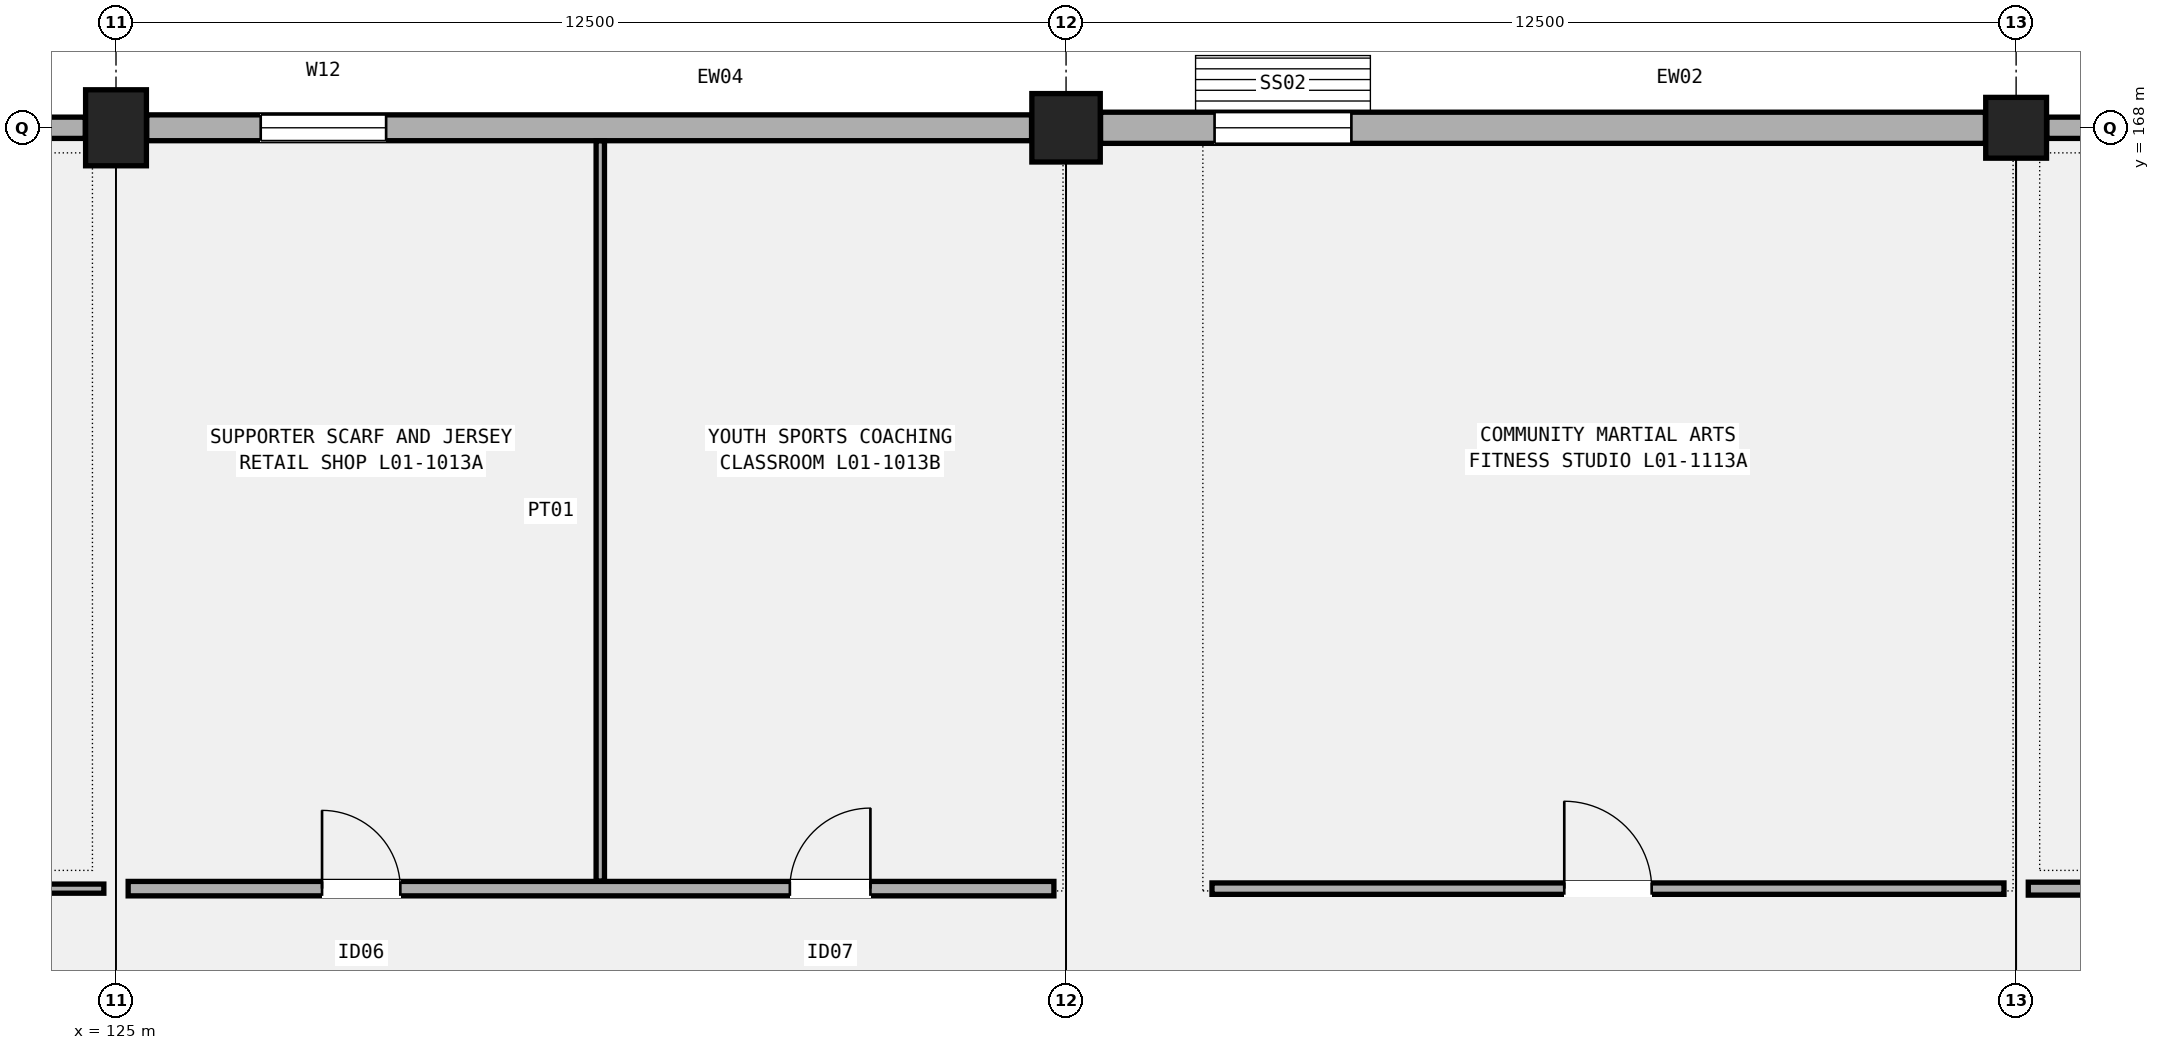
"""IFC4 building model, lengths in metres.
Left out: names, types, materials, properties, quantities, classifications, styles, units other than length and angle.
Written with IfcOpenShell. Run it as: python <this file> out.ifc"""

import sys

from ifc_helpers import new_model, si_unit, direction, frame, frame_2d, origin, origin_2d, place, context, subcontext, project, spatial, rectangle, extrude, element, fill, save


model = new_model("IFC4")
c1 = context("Model", 3, precision=1e-05, world=origin(), true_north=direction((0.0, 1.0)))
c2 = subcontext(c1, "Body", "Model", "MODEL_VIEW")
j1 = project(units=[si_unit("LENGTHUNIT", "METRE"), si_unit("PLANEANGLEUNIT", "RADIAN")], contexts=[c1])
p1 = place(None, origin())
s1 = spatial("IfcSite", under=j1, at=p1, CompositionType="ELEMENT")
p2 = place(p1, origin())
s2 = spatial("IfcBuilding", under=s1, at=p2, CompositionType="ELEMENT")
p3 = place(p2, frame((0.0, 0.0, 5.4)))
s3 = spatial("IfcBuildingStorey", under=s2, at=p3, CompositionType="ELEMENT", Elevation=5.4)
p4 = place(p3, frame((125.0, 168.0, 0.0), z_axis=(0.0, 0.0, 1.0), x_axis=(1.0, 0.0, 0.0)))
e1 = element("IfcColumn", 1, at=p4, inside=s3, PredefinedType="COLUMN", context=c2, shape_type="SweptSolid", body=[
    extrude(rectangle(XDim=0.8, YDim=1.0, at=origin_2d()), origin(), (0.0, 0.0, 1.0), 4.8),
])
p5 = place(p3, frame((137.5, 168.0, 0.0), z_axis=(0.0, 0.0, 1.0), x_axis=(1.0, 0.0, 0.0)))
e2 = element("IfcColumn", 2, at=p5, inside=s3, PredefinedType="COLUMN", context=c2, shape_type="SweptSolid", body=[
    extrude(rectangle(XDim=0.9, YDim=0.9, at=origin_2d()), origin(), (0.0, 0.0, 1.0), 4.8),
])
p6 = place(p3, frame((150.0, 168.0, 0.0), z_axis=(0.0, 0.0, 1.0), x_axis=(1.0, 0.0, 0.0)))
e3 = element("IfcColumn", 3, at=p6, inside=s3, PredefinedType="COLUMN", context=c2, shape_type="SweptSolid", body=[
    extrude(rectangle(XDim=0.8, YDim=0.8, at=origin_2d()), origin(), (0.0, 0.0, 1.0), 4.8),
])
p7 = place(p3, frame((112.404, 168.0, 0.0), z_axis=(0.0, 0.0, 1.0), x_axis=(1.0, 0.0, 0.0)))
e4 = element("IfcWall", 4, at=p7, inside=s3, PredefinedType="SOLIDWALL", context=c2, shape_type="SweptSolid", body=[
    extrude(rectangle(XDim=12.192, YDim=0.28, at=frame_2d((6.096, 0.0))), origin(), (0.0, 0.0, 1.0), 4.2),
])
p8 = place(p7, frame((2.75, 0.0, 0.95)))
e5 = element("IfcOpeningElement", 5, at=p8, cuts=e4, PredefinedType="OPENING", context=c2, shape_type="SweptSolid", body=[
    extrude(rectangle(XDim=1.5, YDim=2.25, at=frame_2d((0.75, 1.125))), frame((0.0, 0.15, 0.0), z_axis=(0.0, -1.0, 0.0), x_axis=(1.0, 0.0, 0.0)), (0.0, 0.0, 1.0), 0.3),
])
p9 = place(p3, frame((125.404, 168.0, 0.0), z_axis=(0.0, 0.0, 1.0), x_axis=(1.0, 0.0, 0.0)))
e6 = element("IfcWall", 6, at=p9, inside=s3, PredefinedType="SOLIDWALL", context=c2, shape_type="SweptSolid", body=[
    extrude(rectangle(XDim=11.642, YDim=0.34, at=frame_2d((5.821, 0.0))), origin(), (0.0, 0.0, 1.0), 4.15),
])
p10 = place(p9, frame((1.5, 0.0, 0.95)))
e7 = element("IfcOpeningElement", 7, at=p10, cuts=e6, PredefinedType="OPENING", context=c2, shape_type="SweptSolid", body=[
    extrude(rectangle(XDim=1.65, YDim=2.45, at=frame_2d((0.825, 1.225))), frame((0.0, 0.18, 0.0), z_axis=(0.0, -1.0, 0.0), x_axis=(1.0, 0.0, 0.0)), (0.0, 0.0, 1.0), 0.36),
])
p11 = place(p3, frame((137.954, 168.0, 0.0), z_axis=(0.0, 0.0, 1.0), x_axis=(1.0, 0.0, 0.0)))
e8 = element("IfcWall", 8, at=p11, inside=s3, PredefinedType="SOLIDWALL", context=c2, shape_type="SweptSolid", body=[
    extrude(rectangle(XDim=11.642, YDim=0.41, at=frame_2d((5.821, 0.0))), origin(), (0.0, 0.0, 1.0), 4.2),
])
p12 = place(p11, frame((1.5, 0.0, 0.95)))
e9 = element("IfcOpeningElement", 9, at=p12, cuts=e8, PredefinedType="OPENING", context=c2, shape_type="SweptSolid", body=[
    extrude(rectangle(XDim=1.8, YDim=2.15, at=frame_2d((0.9, 1.075))), frame((0.0, 0.215, 0.0), z_axis=(0.0, -1.0, 0.0), x_axis=(1.0, 0.0, 0.0)), (0.0, 0.0, 1.0), 0.43),
])
p13 = place(p3, frame((150.404, 168.0, 0.0), z_axis=(0.0, 0.0, 1.0), x_axis=(1.0, 0.0, 0.0)))
e10 = element("IfcWall", 10, at=p13, inside=s3, PredefinedType="SOLIDWALL", context=c2, shape_type="SweptSolid", body=[
    extrude(rectangle(XDim=11.692, YDim=0.28, at=frame_2d((5.846, 0.0))), origin(), (0.0, 0.0, 1.0), 4.15),
])
p14 = place(p13, frame((1.5, 0.0, 0.95)))
e11 = element("IfcOpeningElement", 11, at=p14, cuts=e10, PredefinedType="OPENING", context=c2, shape_type="SweptSolid", body=[
    extrude(rectangle(XDim=1.95, YDim=1.9, at=frame_2d((0.975, 0.95))), frame((0.0, 0.15, 0.0), z_axis=(0.0, -1.0, 0.0), x_axis=(1.0, 0.0, 0.0)), (0.0, 0.0, 1.0), 0.3),
])
p15 = place(p3, frame((112.16, 157.99, 0.0), z_axis=(0.0, 0.0, 1.0), x_axis=(1.0, 0.0, 0.0)))
e12 = element("IfcWall", 12, at=p15, inside=s3, PredefinedType="PARTITIONING", context=c2, shape_type="SweptSolid", body=[
    extrude(rectangle(XDim=12.68, YDim=0.12, at=frame_2d((6.34, 0.0))), origin(), (0.0, 0.0, 1.0), 3.92),
])
p16 = place(p15, frame((5.85, 0.0, 0.0)))
e13 = element("IfcOpeningElement", 13, at=p16, cuts=e12, PredefinedType="OPENING", context=c2, shape_type="SweptSolid", body=[
    extrude(rectangle(XDim=0.98, YDim=2.1, at=frame_2d((0.49, 1.05))), frame((0.0, 0.07, 0.0), z_axis=(0.0, -1.0, 0.0), x_axis=(1.0, 0.0, 0.0)), (0.0, 0.0, 1.0), 0.14),
])
p17 = place(p3, frame((125.16, 157.99, 0.0), z_axis=(0.0, 0.0, 1.0), x_axis=(1.0, 0.0, 0.0)))
e14 = element("IfcWall", 14, at=p17, inside=s3, PredefinedType="PARTITIONING", context=c2, shape_type="SweptSolid", body=[
    extrude(rectangle(XDim=12.18, YDim=0.19, at=frame_2d((6.09, 0.0))), origin(), (0.0, 0.0, 1.0), 3.92),
])
p18 = place(p17, frame((2.551, 0.0, 0.0)))
e15 = element("IfcOpeningElement", 15, at=p18, cuts=e14, PredefinedType="OPENING", context=c2, shape_type="SweptSolid", body=[
    extrude(rectangle(XDim=1.03, YDim=2.12, at=frame_2d((0.515, 1.06))), frame((0.0, 0.105, 0.0), z_axis=(0.0, -1.0, 0.0), x_axis=(1.0, 0.0, 0.0)), (0.0, 0.0, 1.0), 0.21),
])
p19 = place(p17, frame((8.706, 0.0, 0.0)))
e16 = element("IfcOpeningElement", 16, at=p19, cuts=e14, PredefinedType="OPENING", context=c2, shape_type="SweptSolid", body=[
    extrude(rectangle(XDim=1.06, YDim=2.15, at=frame_2d((0.53, 1.075))), frame((0.0, 0.105, 0.0), z_axis=(0.0, -1.0, 0.0), x_axis=(1.0, 0.0, 0.0)), (0.0, 0.0, 1.0), 0.21),
])
p20 = place(p3, frame((131.372, 158.09, 0.0), z_axis=(0.0, 0.0, 1.0), x_axis=(0.0, 1.0, 0.0)))
e17 = element("IfcWall", 17, at=p20, inside=s3, PredefinedType="PARTITIONING", context=c2, shape_type="SweptSolid", body=[
    extrude(rectangle(XDim=9.738, YDim=0.11, at=frame_2d((4.869, 0.0))), origin(), (0.0, 0.0, 1.0), 3.92),
])
p21 = place(p3, frame((139.42, 157.99, 0.0), z_axis=(0.0, 0.0, 1.0), x_axis=(1.0, 0.0, 0.0)))
e18 = element("IfcWall", 18, at=p21, inside=s3, PredefinedType="PARTITIONING", context=c2, shape_type="SweptSolid", body=[
    extrude(rectangle(XDim=10.42, YDim=0.15, at=frame_2d((5.21, 0.0))), origin(), (0.0, 0.0, 1.0), 3.92),
])
p22 = place(p21, frame((4.635, 0.0, 0.0)))
e19 = element("IfcOpeningElement", 19, at=p22, cuts=e18, PredefinedType="OPENING", context=c2, shape_type="SweptSolid", body=[
    extrude(rectangle(XDim=1.15, YDim=2.15, at=frame_2d((0.575, 1.075))), frame((0.0, 0.085, 0.0), z_axis=(0.0, -1.0, 0.0), x_axis=(1.0, 0.0, 0.0)), (0.0, 0.0, 1.0), 0.17),
])
p23 = place(p3, frame((150.16, 157.99, 0.0), z_axis=(0.0, 0.0, 1.0), x_axis=(1.0, 0.0, 0.0)))
e20 = element("IfcWall", 20, at=p23, inside=s3, PredefinedType="PARTITIONING", context=c2, shape_type="SweptSolid", body=[
    extrude(rectangle(XDim=12.18, YDim=0.17, at=frame_2d((6.09, 0.0))), origin(), (0.0, 0.0, 1.0), 3.92),
])
p24 = place(p23, frame((5.455, 0.0, 0.0)))
e21 = element("IfcOpeningElement", 21, at=p24, cuts=e20, PredefinedType="OPENING", context=c2, shape_type="SweptSolid", body=[
    extrude(rectangle(XDim=1.27, YDim=2.2, at=frame_2d((0.635, 1.1))), frame((0.0, 0.095, 0.0), z_axis=(0.0, -1.0, 0.0), x_axis=(1.0, 0.0, 0.0)), (0.0, 0.0, 1.0), 0.19),
])
p25 = place(p10, origin())
e22 = element("IfcWindow", 22, at=p25, inside=s3, PartitioningType="SINGLE_PANEL", PredefinedType="WINDOW", context=c2, shape_type="SweptSolid", body=[
    extrude(rectangle(XDim=1.65, YDim=2.45, at=frame_2d((0.825, 1.225))), frame((0.0, 0.03, 0.0), z_axis=(0.0, -1.0, 0.0), x_axis=(1.0, 0.0, 0.0)), (0.0, 0.0, 1.0), 0.06),
])
fill(e7, e22)
p26 = place(p12, origin())
e23 = element("IfcWindow", 23, at=p26, inside=s3, PartitioningType="SINGLE_PANEL", PredefinedType="WINDOW", context=c2, shape_type="SweptSolid", body=[
    extrude(rectangle(XDim=1.8, YDim=2.15, at=frame_2d((0.9, 1.075))), frame((0.0, 0.03, 0.0), z_axis=(0.0, -1.0, 0.0), x_axis=(1.0, 0.0, 0.0)), (0.0, 0.0, 1.0), 0.06),
])
fill(e9, e23)
p27 = place(p18, origin())
e24 = element("IfcDoor", 24, at=p27, inside=s3, OperationType="SINGLE_SWING_LEFT", PredefinedType="DOOR", context=c2, shape_type="SweptSolid", body=[
    extrude(rectangle(XDim=1.03, YDim=2.12, at=frame_2d((0.515, 1.06))), frame((0.0, 0.025, 0.0), z_axis=(0.0, -1.0, 0.0), x_axis=(1.0, 0.0, 0.0)), (0.0, 0.0, 1.0), 0.05),
])
fill(e15, e24)
p28 = place(p19, origin())
e25 = element("IfcDoor", 25, at=p28, inside=s3, OperationType="SINGLE_SWING_RIGHT", PredefinedType="DOOR", context=c2, shape_type="SweptSolid", body=[
    extrude(rectangle(XDim=1.06, YDim=2.15, at=frame_2d((0.53, 1.075))), frame((0.0, 0.025, 0.0), z_axis=(0.0, -1.0, 0.0), x_axis=(1.0, 0.0, 0.0)), (0.0, 0.0, 1.0), 0.05),
])
fill(e16, e25)
p29 = place(p22, origin())
e26 = element("IfcDoor", 26, at=p29, inside=s3, OperationType="SINGLE_SWING_LEFT", PredefinedType="DOOR", context=c2, shape_type="SweptSolid", body=[
    extrude(rectangle(XDim=1.15, YDim=2.15, at=frame_2d((0.575, 1.075))), frame((0.0, 0.025, 0.0), z_axis=(0.0, -1.0, 0.0), x_axis=(1.0, 0.0, 0.0)), (0.0, 0.0, 1.0), 0.05),
])
fill(e19, e26)
save(model, sys.argv[1])
